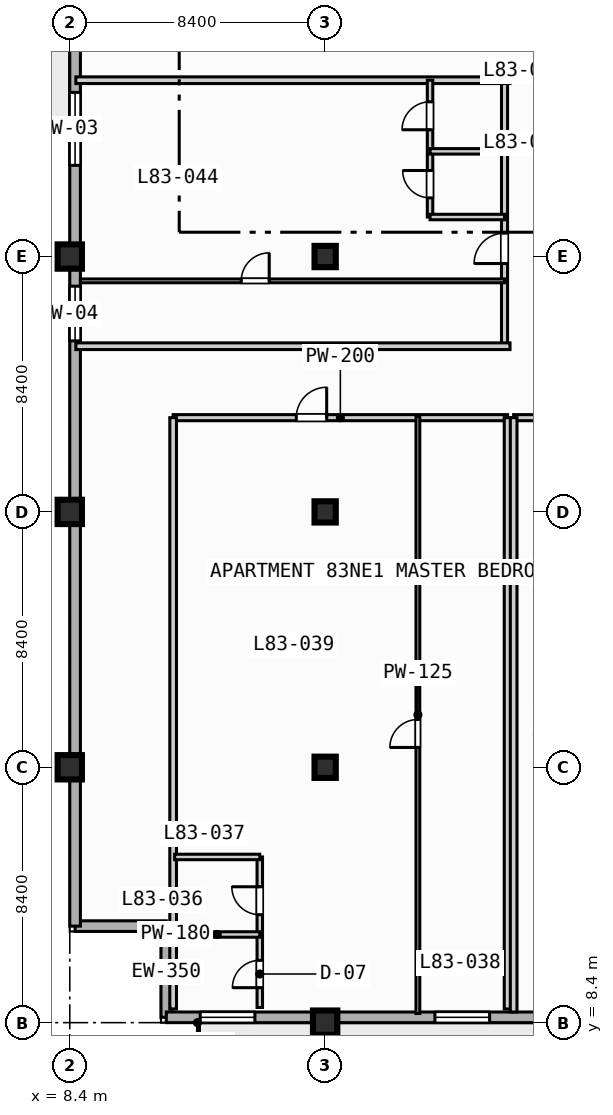
"""IFC4 building model, lengths in metres.
Left out: names, types, materials, properties, quantities, classifications, styles, units other than length and angle.
Written with IfcOpenShell. Run it as: python <this file> out.ifc"""

import sys

from ifc_helpers import new_model, si_unit, direction, frame, frame_2d, origin, origin_2d, place, context, subcontext, project, spatial, rectangle, extrude, element, fill, save


model = new_model("IFC4")
c1 = context("Model", 3, precision=1e-05, world=origin(), true_north=direction((0.0, 1.0)))
c2 = subcontext(c1, "Body", "Model", "MODEL_VIEW")
j1 = project(units=[si_unit("LENGTHUNIT", "METRE"), si_unit("PLANEANGLEUNIT", "RADIAN")], contexts=[c1])
p1 = place(None, origin())
s1 = spatial("IfcSite", under=j1, at=p1, CompositionType="ELEMENT")
p2 = place(p1, origin())
s2 = spatial("IfcBuilding", under=s1, at=p2, CompositionType="ELEMENT")
p3 = place(p2, frame((0.0, 0.0, 335.9)))
s3 = spatial("IfcBuildingStorey", under=s2, at=p3, CompositionType="ELEMENT", Elevation=335.9)
for number, where, z_axis, x_axis in (
    (1, (8.4, 16.8, 0.0), (0.0, 0.0, 1.0), (1.0, 0.0, 0.0)),
    (2, (8.4, 25.2, 0.0), (0.0, 0.0, 1.0), (1.0, 0.0, 0.0)),
    (3, (8.4, 33.6, 0.0), (0.0, 0.0, 1.0), (1.0, 0.0, 0.0)),
    (4, (16.8, 8.4, 0.0), (0.0, 0.0, 1.0), (1.0, 0.0, 0.0)),
):
    element("IfcColumn", number, at=place(p3, frame(where, z_axis=z_axis, x_axis=x_axis)), inside=s3, PredefinedType="COLUMN", context=c2, shape_type="SweptSolid", body=[
        extrude(rectangle(XDim=0.8, YDim=0.8, at=origin_2d()), origin(), (0.0, 0.0, 1.0), 3.9),
    ])
for number, where, z_axis, x_axis in (
    (5, (16.8, 16.8, 0.0), (0.0, 0.0, 1.0), (1.0, 0.0, 0.0)),
    (6, (16.8, 25.2, 0.0), (0.0, 0.0, 1.0), (1.0, 0.0, 0.0)),
    (7, (16.8, 33.6, 0.0), (0.0, 0.0, 1.0), (1.0, 0.0, 0.0)),
):
    element("IfcColumn", number, at=place(p3, frame(where, z_axis=z_axis, x_axis=x_axis)), inside=s3, PredefinedType="COLUMN", context=c2, shape_type="SweptSolid", body=[
        extrude(rectangle(XDim=0.7, YDim=0.7, at=origin_2d()), origin(), (0.0, 0.0, 1.0), 3.9),
    ])
for number, where, z_axis, x_axis in (
    (8, (11.575, 8.575, 0.0), (0.0, 0.0, 1.0), (0.0, 1.0, 0.0)),
    (9, (11.575, 11.575, 0.0), (0.0, 0.0, 1.0), (-1.0, 0.0, 0.0)),
):
    element("IfcWall", number, at=place(p3, frame(where, z_axis=z_axis, x_axis=x_axis)), inside=s3, PredefinedType="STANDARD", context=c2, shape_type="SweptSolid", body=[
        extrude(rectangle(XDim=3.0, YDim=0.35, at=frame_2d((1.5, 0.0))), origin(), (0.0, 0.0, 1.0), 3.67),
    ])
p4 = place(p3, frame((8.575, 11.575, 0.0), z_axis=(0.0, 0.0, 1.0), x_axis=(0.0, 1.0, 0.0)))
e10 = element("IfcWall", 10, at=p4, inside=s3, PredefinedType="STANDARD", context=c2, shape_type="SweptSolid", body=[
    extrude(rectangle(XDim=60.85, YDim=0.35, at=frame_2d((30.425, 0.0))), origin(), (0.0, 0.0, 1.0), 3.67),
])
p5 = place(p4, frame((33.925, 0.0, 0.0)))
e11 = element("IfcOpeningElement", 11, at=p5, cuts=e10, PredefinedType="OPENING", context=c2, shape_type="SweptSolid", body=[
    extrude(rectangle(XDim=1.4, YDim=2.2, at=frame_2d((0.7, 1.1))), frame((0.0, 0.185, 0.0), z_axis=(0.0, -1.0, 0.0), x_axis=(1.0, 0.0, 0.0)), (0.0, 0.0, 1.0), 0.37),
])
p6 = place(p4, frame((25.025, 0.0, 0.85)))
e12 = element("IfcOpeningElement", 12, at=p6, cuts=e10, PredefinedType="OPENING", context=c2, shape_type="SweptSolid", body=[
    extrude(rectangle(XDim=2.4, YDim=1.95, at=frame_2d((1.2, 0.975))), frame((0.0, 0.185, 0.0), z_axis=(0.0, -1.0, 0.0), x_axis=(1.0, 0.0, 0.0)), (0.0, 0.0, 1.0), 0.37),
])
p7 = place(p4, frame((41.825, 0.0, 0.85)))
e13 = element("IfcOpeningElement", 13, at=p7, cuts=e10, PredefinedType="OPENING", context=c2, shape_type="SweptSolid", body=[
    extrude(rectangle(XDim=2.4, YDim=1.95, at=frame_2d((1.2, 0.975))), frame((0.0, 0.185, 0.0), z_axis=(0.0, -1.0, 0.0), x_axis=(1.0, 0.0, 0.0)), (0.0, 0.0, 1.0), 0.37),
])
p8 = place(p4, frame((19.25, 0.0, 0.85)))
e14 = element("IfcOpeningElement", 14, at=p8, cuts=e10, PredefinedType="OPENING", context=c2, shape_type="SweptSolid", body=[
    extrude(rectangle(XDim=1.8, YDim=1.8, at=frame_2d((0.9, 0.9))), frame((0.0, 0.185, 0.0), z_axis=(0.0, -1.0, 0.0), x_axis=(1.0, 0.0, 0.0)), (0.0, 0.0, 1.0), 0.37),
])
p9 = place(p3, frame((64.025, 8.575, 0.0), z_axis=(0.0, 0.0, 1.0), x_axis=(-1.0, 0.0, 0.0)))
e15 = element("IfcWall", 15, at=p9, inside=s3, PredefinedType="STANDARD", context=c2, shape_type="SweptSolid", body=[
    extrude(rectangle(XDim=52.45, YDim=0.35, at=frame_2d((26.225, 0.0))), origin(), (0.0, 0.0, 1.0), 3.67),
])
p10 = place(p9, frame((33.925, 0.0, 0.0)))
e16 = element("IfcOpeningElement", 16, at=p10, cuts=e15, PredefinedType="OPENING", context=c2, shape_type="SweptSolid", body=[
    extrude(rectangle(XDim=1.4, YDim=2.2, at=frame_2d((0.7, 1.1))), frame((0.0, 0.185, 0.0), z_axis=(0.0, -1.0, 0.0), x_axis=(1.0, 0.0, 0.0)), (0.0, 0.0, 1.0), 0.37),
])
p11 = place(p9, frame((25.025, 0.0, 0.85)))
e17 = element("IfcOpeningElement", 17, at=p11, cuts=e15, PredefinedType="OPENING", context=c2, shape_type="SweptSolid", body=[
    extrude(rectangle(XDim=2.4, YDim=1.95, at=frame_2d((1.2, 0.975))), frame((0.0, 0.185, 0.0), z_axis=(0.0, -1.0, 0.0), x_axis=(1.0, 0.0, 0.0)), (0.0, 0.0, 1.0), 0.37),
])
p12 = place(p9, frame((16.925, 0.0, 0.85)))
e18 = element("IfcOpeningElement", 18, at=p12, cuts=e15, PredefinedType="OPENING", context=c2, shape_type="SweptSolid", body=[
    extrude(rectangle(XDim=1.8, YDim=1.8, at=frame_2d((0.9, 0.9))), frame((0.0, 0.185, 0.0), z_axis=(0.0, -1.0, 0.0), x_axis=(1.0, 0.0, 0.0)), (0.0, 0.0, 1.0), 0.37),
])
p13 = place(p9, frame((41.815, 0.0, 0.85)))
e19 = element("IfcOpeningElement", 19, at=p13, cuts=e15, PredefinedType="OPENING", context=c2, shape_type="SweptSolid", body=[
    extrude(rectangle(XDim=1.8, YDim=1.8, at=frame_2d((0.9, 0.9))), frame((0.0, 0.185, 0.0), z_axis=(0.0, -1.0, 0.0), x_axis=(1.0, 0.0, 0.0)), (0.0, 0.0, 1.0), 0.37),
])
p14 = place(p9, frame((49.535, 0.0, 0.85)))
e20 = element("IfcOpeningElement", 20, at=p14, cuts=e15, PredefinedType="OPENING", context=c2, shape_type="SweptSolid", body=[
    extrude(rectangle(XDim=1.8, YDim=1.8, at=frame_2d((0.9, 0.9))), frame((0.0, 0.185, 0.0), z_axis=(0.0, -1.0, 0.0), x_axis=(1.0, 0.0, 0.0)), (0.0, 0.0, 1.0), 0.37),
])
p15 = place(p3, frame((11.8, 28.3, 0.0), z_axis=(0.0, 0.0, 1.0), x_axis=(1.0, 0.0, 0.0)))
e21 = element("IfcWall", 21, at=p15, inside=s3, PredefinedType="PARTITIONING", context=c2, shape_type="SweptSolid", body=[
    extrude(rectangle(XDim=11.0, YDim=0.2, at=frame_2d((5.5, 0.0))), origin(), (0.0, 0.0, 1.0), 3.67),
])
p16 = place(p15, frame((4.05, 0.0, 0.0)))
e22 = element("IfcOpeningElement", 22, at=p16, cuts=e21, PredefinedType="OPENING", context=c2, shape_type="SweptSolid", body=[
    extrude(rectangle(XDim=1.0, YDim=2.15, at=frame_2d((0.5, 1.075))), frame((0.0, 0.11, 0.0), z_axis=(0.0, -1.0, 0.0), x_axis=(1.0, 0.0, 0.0)), (0.0, 0.0, 1.0), 0.22),
])
for number, where, z_axis, x_axis in (
    (23, (22.8, 8.85, 0.0), (0.0, 0.0, 1.0), (0.0, 1.0, 0.0)),
    (24, (11.8, 8.85, 0.0), (0.0, 0.0, 1.0), (0.0, 1.0, 0.0)),
):
    element("IfcWall", number, at=place(p3, frame(where, z_axis=z_axis, x_axis=x_axis)), inside=s3, PredefinedType="PARTITIONING", context=c2, shape_type="SweptSolid", body=[
        extrude(rectangle(XDim=19.45, YDim=0.22, at=frame_2d((9.725, 0.0))), origin(), (0.0, 0.0, 1.0), 3.67),
    ])
p17 = place(p3, frame((14.65, 8.9, 0.0), z_axis=(0.0, 0.0, 1.0), x_axis=(0.0, 1.0, 0.0)))
e25 = element("IfcWall", 25, at=p17, inside=s3, PredefinedType="PLUMBINGWALL", context=c2, shape_type="SweptSolid", body=[
    extrude(rectangle(XDim=4.95, YDim=0.18, at=frame_2d((2.475, 0.0))), origin(), (0.0, 0.0, 1.0), 3.67),
])
p18 = place(p17, frame((0.65, 0.0, 0.0)))
e26 = element("IfcOpeningElement", 26, at=p18, cuts=e25, PredefinedType="OPENING", context=c2, shape_type="SweptSolid", body=[
    extrude(rectangle(XDim=0.9, YDim=2.1, at=frame_2d((0.45, 1.05))), frame((0.0, 0.1, 0.0), z_axis=(0.0, -1.0, 0.0), x_axis=(1.0, 0.0, 0.0)), (0.0, 0.0, 1.0), 0.2),
])
p19 = place(p17, frame((3.05, 0.0, 0.0)))
e27 = element("IfcOpeningElement", 27, at=p19, cuts=e25, PredefinedType="OPENING", context=c2, shape_type="SweptSolid", body=[
    extrude(rectangle(XDim=0.92, YDim=2.1, at=frame_2d((0.46, 1.05))), frame((0.0, 0.1, 0.0), z_axis=(0.0, -1.0, 0.0), x_axis=(1.0, 0.0, 0.0)), (0.0, 0.0, 1.0), 0.2),
])
for number, where, z_axis, x_axis in (
    (28, (11.85, 11.3, 0.0), (0.0, 0.0, 1.0), (1.0, 0.0, 0.0)),
    (29, (11.85, 13.85, 0.0), (0.0, 0.0, 1.0), (1.0, 0.0, 0.0)),
):
    element("IfcWall", number, at=place(p3, frame(where, z_axis=z_axis, x_axis=x_axis)), inside=s3, PredefinedType="PLUMBINGWALL", context=c2, shape_type="SweptSolid", body=[
        extrude(rectangle(XDim=2.8, YDim=0.18, at=frame_2d((1.4, 0.0))), origin(), (0.0, 0.0, 1.0), 3.67),
    ])
p20 = place(p3, frame((19.85, 8.7, 0.0), z_axis=(0.0, 0.0, 1.0), x_axis=(0.0, 1.0, 0.0)))
e30 = element("IfcWall", 30, at=p20, inside=s3, PredefinedType="PARTITIONING", context=c2, shape_type="SweptSolid", body=[
    extrude(rectangle(XDim=19.65, YDim=0.125, at=frame_2d((9.825, 0.0))), origin(), (0.0, 0.0, 1.0), 3.67),
])
p21 = place(p20, frame((8.752, 0.0, 0.0)))
e31 = element("IfcOpeningElement", 31, at=p21, cuts=e30, PredefinedType="OPENING", context=c2, shape_type="SweptSolid", body=[
    extrude(rectangle(XDim=0.92, YDim=2.1, at=frame_2d((0.46, 1.05))), frame((0.0, 0.073, 0.0), z_axis=(0.0, -1.0, 0.0), x_axis=(1.0, 0.0, 0.0)), (0.0, 0.0, 1.0), 0.145),
])
p22 = place(p3, frame((23.0, 28.3, 0.0), z_axis=(0.0, 0.0, 1.0), x_axis=(1.0, 0.0, 0.0)))
e32 = element("IfcWall", 32, at=p22, inside=s3, PredefinedType="PARTITIONING", context=c2, shape_type="SweptSolid", body=[
    extrude(rectangle(XDim=16.2, YDim=0.2, at=frame_2d((8.1, 0.0))), origin(), (0.0, 0.0, 1.0), 3.67),
])
p23 = place(p22, frame((5.5, 0.0, 0.0)))
e33 = element("IfcOpeningElement", 33, at=p23, cuts=e32, PredefinedType="OPENING", context=c2, shape_type="SweptSolid", body=[
    extrude(rectangle(XDim=2.0, YDim=2.15, at=frame_2d((1.0, 1.075))), frame((0.0, 0.11, 0.0), z_axis=(0.0, -1.0, 0.0), x_axis=(1.0, 0.0, 0.0)), (0.0, 0.0, 1.0), 0.22),
])
p24 = place(p3, frame((23.0, 8.75, 0.0), z_axis=(0.0, 0.0, 1.0), x_axis=(0.0, 1.0, 0.0)))
e34 = element("IfcWall", 34, at=p24, inside=s3, PredefinedType="PARTITIONING", context=c2, shape_type="SweptSolid", body=[
    extrude(rectangle(XDim=19.55, YDim=0.22, at=frame_2d((9.775, 0.0))), origin(), (0.0, 0.0, 1.0), 3.67),
])
p25 = place(p3, frame((22.7, 30.65, 0.0), z_axis=(0.0, 0.0, 1.0), x_axis=(0.0, 1.0, 0.0)))
e35 = element("IfcWall", 35, at=p25, inside=s3, PredefinedType="PARTITIONING", context=c2, shape_type="SweptSolid", body=[
    extrude(rectangle(XDim=8.75, YDim=0.2, at=frame_2d((4.375, 0.0))), origin(), (0.0, 0.0, 1.0), 3.67),
])
p26 = place(p25, frame((2.72, 0.0, 0.0)))
e36 = element("IfcOpeningElement", 36, at=p26, cuts=e35, PredefinedType="OPENING", context=c2, shape_type="SweptSolid", body=[
    extrude(rectangle(XDim=1.0, YDim=2.15, at=frame_2d((0.5, 1.075))), frame((0.0, 0.11, 0.0), z_axis=(0.0, -1.0, 0.0), x_axis=(1.0, 0.0, 0.0)), (0.0, 0.0, 1.0), 0.22),
])
for number, where, z_axis, x_axis in (
    (37, (8.6, 30.65, 0.0), (0.0, 0.0, 1.0), (1.0, 0.0, 0.0)),
    (38, (8.6, 39.4, 0.0), (0.0, 0.0, 1.0), (1.0, 0.0, 0.0)),
):
    element("IfcWall", number, at=place(p3, frame(where, z_axis=z_axis, x_axis=x_axis)), inside=s3, PredefinedType="PARTITIONING", context=c2, shape_type="SweptSolid", body=[
        extrude(rectangle(XDim=14.28, YDim=0.22, at=frame_2d((7.14, 0.0))), origin(), (0.0, 0.0, 1.0), 3.67),
    ])
p27 = place(p3, frame((20.25, 34.9, 0.0), z_axis=(0.0, 0.0, 1.0), x_axis=(0.0, 1.0, 0.0)))
e39 = element("IfcWall", 39, at=p27, inside=s3, PredefinedType="PLUMBINGWALL", context=c2, shape_type="SweptSolid", body=[
    extrude(rectangle(XDim=4.5, YDim=0.18, at=frame_2d((2.25, 0.0))), origin(), (0.0, 0.0, 1.0), 3.67),
])
p28 = place(p27, frame((0.63, 0.0, 0.0)))
e40 = element("IfcOpeningElement", 40, at=p28, cuts=e39, PredefinedType="OPENING", context=c2, shape_type="SweptSolid", body=[
    extrude(rectangle(XDim=0.9, YDim=2.1, at=frame_2d((0.45, 1.05))), frame((0.0, 0.1, 0.0), z_axis=(0.0, -1.0, 0.0), x_axis=(1.0, 0.0, 0.0)), (0.0, 0.0, 1.0), 0.2),
])
p29 = place(p27, frame((2.87, 0.0, 0.0)))
e41 = element("IfcOpeningElement", 41, at=p29, cuts=e39, PredefinedType="OPENING", context=c2, shape_type="SweptSolid", body=[
    extrude(rectangle(XDim=0.92, YDim=2.1, at=frame_2d((0.46, 1.05))), frame((0.0, 0.1, 0.0), z_axis=(0.0, -1.0, 0.0), x_axis=(1.0, 0.0, 0.0)), (0.0, 0.0, 1.0), 0.2),
])
for number, where, z_axis, x_axis in (
    (42, (20.25, 34.9, 0.0), (0.0, 0.0, 1.0), (1.0, 0.0, 0.0)),
    (43, (20.25, 37.06, 0.0), (0.0, 0.0, 1.0), (1.0, 0.0, 0.0)),
):
    element("IfcWall", number, at=place(p3, frame(where, z_axis=z_axis, x_axis=x_axis)), inside=s3, PredefinedType="PLUMBINGWALL", context=c2, shape_type="SweptSolid", body=[
        extrude(rectangle(XDim=2.45, YDim=0.18, at=frame_2d((1.225, 0.0))), origin(), (0.0, 0.0, 1.0), 3.67),
    ])
p30 = place(p3, frame((8.75, 32.8, 0.0), z_axis=(0.0, 0.0, 1.0), x_axis=(1.0, 0.0, 0.0)))
e44 = element("IfcWall", 44, at=p30, inside=s3, PredefinedType="PARTITIONING", context=c2, shape_type="SweptSolid", body=[
    extrude(rectangle(XDim=13.95, YDim=0.125, at=frame_2d((6.975, 0.0))), origin(), (0.0, 0.0, 1.0), 3.67),
])
p31 = place(p30, frame((5.29, 0.0, 0.0)))
e45 = element("IfcOpeningElement", 45, at=p31, cuts=e44, PredefinedType="OPENING", context=c2, shape_type="SweptSolid", body=[
    extrude(rectangle(XDim=0.92, YDim=2.1, at=frame_2d((0.46, 1.05))), frame((0.0, 0.073, 0.0), z_axis=(0.0, -1.0, 0.0), x_axis=(1.0, 0.0, 0.0)), (0.0, 0.0, 1.0), 0.145),
])
p32 = place(p6, origin())
e46 = element("IfcWindow", 46, at=p32, inside=s3, PartitioningType="SINGLE_PANEL", PredefinedType="WINDOW", context=c2, shape_type="SweptSolid", body=[
    extrude(rectangle(XDim=2.4, YDim=1.95, at=frame_2d((1.2, 0.975))), frame((0.0, 0.03, 0.0), z_axis=(0.0, -1.0, 0.0), x_axis=(1.0, 0.0, 0.0)), (0.0, 0.0, 1.0), 0.06),
])
fill(e12, e46)
p33 = place(p8, origin())
e47 = element("IfcWindow", 47, at=p33, inside=s3, PartitioningType="SINGLE_PANEL", PredefinedType="WINDOW", context=c2, shape_type="SweptSolid", body=[
    extrude(rectangle(XDim=1.8, YDim=1.8, at=frame_2d((0.9, 0.9))), frame((0.0, 0.03, 0.0), z_axis=(0.0, -1.0, 0.0), x_axis=(1.0, 0.0, 0.0)), (0.0, 0.0, 1.0), 0.06),
])
fill(e14, e47)
p34 = place(p13, origin())
e48 = element("IfcWindow", 48, at=p34, inside=s3, PartitioningType="SINGLE_PANEL", PredefinedType="WINDOW", context=c2, shape_type="SweptSolid", body=[
    extrude(rectangle(XDim=1.8, YDim=1.8, at=frame_2d((0.9, 0.9))), frame((0.0, 0.03, 0.0), z_axis=(0.0, -1.0, 0.0), x_axis=(1.0, 0.0, 0.0)), (0.0, 0.0, 1.0), 0.06),
])
fill(e19, e48)
p35 = place(p14, origin())
e49 = element("IfcWindow", 49, at=p35, inside=s3, PartitioningType="SINGLE_PANEL", PredefinedType="WINDOW", context=c2, shape_type="SweptSolid", body=[
    extrude(rectangle(XDim=1.8, YDim=1.8, at=frame_2d((0.9, 0.9))), frame((0.0, 0.03, 0.0), z_axis=(0.0, -1.0, 0.0), x_axis=(1.0, 0.0, 0.0)), (0.0, 0.0, 1.0), 0.06),
])
fill(e20, e49)
p36 = place(p16, origin())
e50 = element("IfcDoor", 50, at=p36, inside=s3, OperationType="SINGLE_SWING_RIGHT", PredefinedType="DOOR", context=c2, shape_type="SweptSolid", body=[
    extrude(rectangle(XDim=1.0, YDim=2.15, at=frame_2d((0.5, 1.075))), frame((0.0, 0.025, 0.0), z_axis=(0.0, -1.0, 0.0), x_axis=(1.0, 0.0, 0.0)), (0.0, 0.0, 1.0), 0.05),
])
fill(e22, e50)
p37 = place(p18, origin())
e51 = element("IfcDoor", 51, at=p37, inside=s3, OperationType="SINGLE_SWING_LEFT", PredefinedType="DOOR", context=c2, shape_type="SweptSolid", body=[
    extrude(rectangle(XDim=0.9, YDim=2.1, at=frame_2d((0.45, 1.05))), frame((0.0, 0.025, 0.0), z_axis=(0.0, -1.0, 0.0), x_axis=(1.0, 0.0, 0.0)), (0.0, 0.0, 1.0), 0.05),
])
fill(e26, e51)
p38 = place(p19, origin())
e52 = element("IfcDoor", 52, at=p38, inside=s3, OperationType="SINGLE_SWING_RIGHT", PredefinedType="DOOR", context=c2, shape_type="SweptSolid", body=[
    extrude(rectangle(XDim=0.92, YDim=2.1, at=frame_2d((0.46, 1.05))), frame((0.0, 0.025, 0.0), z_axis=(0.0, -1.0, 0.0), x_axis=(1.0, 0.0, 0.0)), (0.0, 0.0, 1.0), 0.05),
])
fill(e27, e52)
p39 = place(p21, origin())
e53 = element("IfcDoor", 53, at=p39, inside=s3, OperationType="SINGLE_SWING_LEFT", PredefinedType="DOOR", context=c2, shape_type="SweptSolid", body=[
    extrude(rectangle(XDim=0.92, YDim=2.1, at=frame_2d((0.46, 1.05))), frame((0.0, 0.025, 0.0), z_axis=(0.0, -1.0, 0.0), x_axis=(1.0, 0.0, 0.0)), (0.0, 0.0, 1.0), 0.05),
])
fill(e31, e53)
p40 = place(p26, origin())
e54 = element("IfcDoor", 54, at=p40, inside=s3, OperationType="SINGLE_SWING_LEFT", PredefinedType="DOOR", context=c2, shape_type="SweptSolid", body=[
    extrude(rectangle(XDim=1.0, YDim=2.15, at=frame_2d((0.5, 1.075))), frame((0.0, 0.025, 0.0), z_axis=(0.0, -1.0, 0.0), x_axis=(1.0, 0.0, 0.0)), (0.0, 0.0, 1.0), 0.05),
])
fill(e36, e54)
p41 = place(p28, origin())
e55 = element("IfcDoor", 55, at=p41, inside=s3, OperationType="SINGLE_SWING_RIGHT", PredefinedType="DOOR", context=c2, shape_type="SweptSolid", body=[
    extrude(rectangle(XDim=0.9, YDim=2.1, at=frame_2d((0.45, 1.05))), frame((0.0, 0.025, 0.0), z_axis=(0.0, -1.0, 0.0), x_axis=(1.0, 0.0, 0.0)), (0.0, 0.0, 1.0), 0.05),
])
fill(e40, e55)
p42 = place(p29, origin())
e56 = element("IfcDoor", 56, at=p42, inside=s3, OperationType="SINGLE_SWING_LEFT", PredefinedType="DOOR", context=c2, shape_type="SweptSolid", body=[
    extrude(rectangle(XDim=0.92, YDim=2.1, at=frame_2d((0.46, 1.05))), frame((0.0, 0.025, 0.0), z_axis=(0.0, -1.0, 0.0), x_axis=(1.0, 0.0, 0.0)), (0.0, 0.0, 1.0), 0.05),
])
fill(e41, e56)
p43 = place(p31, origin())
e57 = element("IfcDoor", 57, at=p43, inside=s3, OperationType="SINGLE_SWING_RIGHT", PredefinedType="DOOR", context=c2, shape_type="SweptSolid", body=[
    extrude(rectangle(XDim=0.92, YDim=2.1, at=frame_2d((0.46, 1.05))), frame((0.0, 0.025, 0.0), z_axis=(0.0, -1.0, 0.0), x_axis=(1.0, 0.0, 0.0)), (0.0, 0.0, 1.0), 0.05),
])
fill(e45, e57)
save(model, sys.argv[1])
